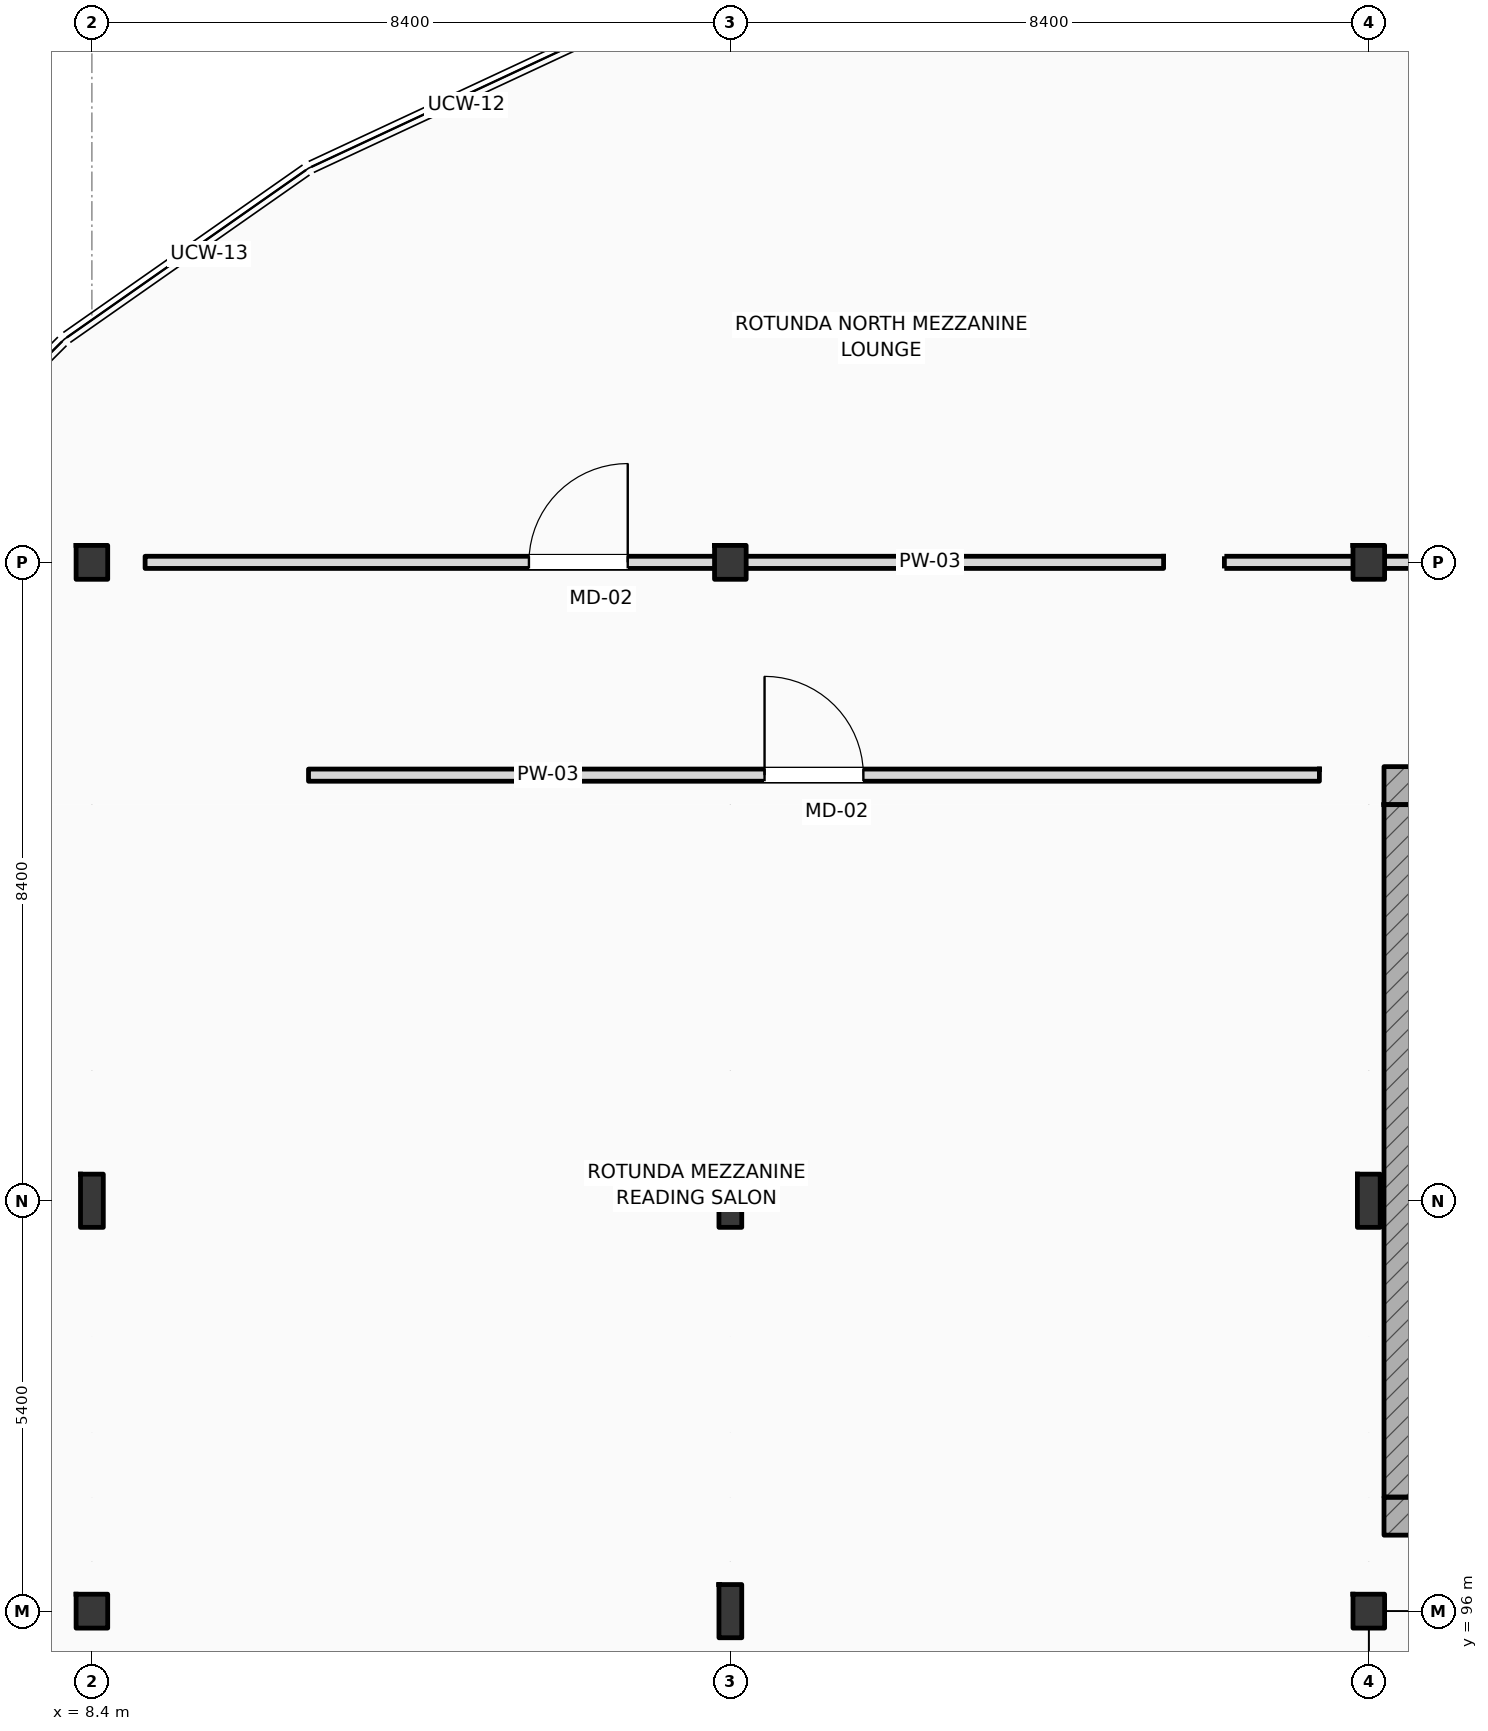
"""IFC4 building model, lengths in metres.
Left out: names, types, materials, properties, quantities, classifications, styles, units other than length and angle.
Written with IfcOpenShell. Run it as: python <this file> out.ifc"""

import sys

from ifc_helpers import new_model, si_unit, direction, frame, frame_2d, origin, origin_2d, place, context, subcontext, project, spatial, rectangle, i_section, extrude, element, fill, save


model = new_model("IFC4")
c1 = context("Model", 3, precision=1e-05, world=origin(), true_north=direction((0.0, 1.0)))
c2 = subcontext(c1, "Body", "Model", "MODEL_VIEW")
j1 = project(units=[si_unit("LENGTHUNIT", "METRE"), si_unit("PLANEANGLEUNIT", "RADIAN")], contexts=[c1])
p1 = place(None, origin())
s1 = spatial("IfcSite", under=j1, at=p1, CompositionType="ELEMENT")
p2 = place(p1, origin())
s2 = spatial("IfcBuilding", under=s1, at=p2, CompositionType="ELEMENT")
p3 = place(p2, frame((0.0, 0.0, 6.0)))
s3 = spatial("IfcBuildingStorey", under=s2, at=p3, CompositionType="ELEMENT", Elevation=6.0)
p4 = place(p3, frame((8.4, 96.0, 0.0), z_axis=(0.0, 0.0, 1.0), x_axis=(1.0, 0.0, 0.0)))
e1 = element("IfcColumn", 1, at=p4, inside=s3, PredefinedType="COLUMN", context=c2, shape_type="SweptSolid", body=[
    extrude(i_section(OverallWidth=0.416, OverallDepth=0.446, WebThickness=0.036, FlangeThickness=0.048, FilletRadius=0.015, at=origin_2d()), origin(), (0.0, 0.0, 1.0), 5.4),
])
p5 = place(p3, frame((16.8, 96.0, 0.0), z_axis=(0.0, 0.0, 1.0), x_axis=(1.0, 0.0, 0.0)))
e2 = element("IfcColumn", 2, at=p5, inside=s3, PredefinedType="COLUMN", context=c2, shape_type="SweptSolid", body=[
    extrude(i_section(OverallWidth=0.3, OverallDepth=0.7, WebThickness=0.017, FlangeThickness=0.032, FilletRadius=0.027, at=origin_2d()), origin(), (0.0, 0.0, 1.0), 5.4),
])
p6 = place(p3, frame((25.2, 96.0, 0.0), z_axis=(0.0, 0.0, 1.0), x_axis=(1.0, 0.0, 0.0)))
e3 = element("IfcColumn", 3, at=p6, inside=s3, PredefinedType="COLUMN", context=c2, shape_type="SweptSolid", body=[
    extrude(i_section(OverallWidth=0.416, OverallDepth=0.446, WebThickness=0.036, FlangeThickness=0.048, FilletRadius=0.015, at=origin_2d()), origin(), (0.0, 0.0, 1.0), 5.4),
])
p7 = place(p3, frame((8.4, 101.4, 0.0), z_axis=(0.0, 0.0, 1.0), x_axis=(1.0, 0.0, 0.0)))
e4 = element("IfcColumn", 4, at=p7, inside=s3, PredefinedType="COLUMN", context=c2, shape_type="SweptSolid", body=[
    extrude(i_section(OverallWidth=0.3, OverallDepth=0.7, WebThickness=0.017, FlangeThickness=0.032, FilletRadius=0.027, at=origin_2d()), origin(), (0.0, 0.0, 1.0), 5.4),
])
p8 = place(p3, frame((8.4, 109.8, 0.0), z_axis=(0.0, 0.0, 1.0), x_axis=(1.0, 0.0, 0.0)))
e5 = element("IfcColumn", 5, at=p8, inside=s3, PredefinedType="COLUMN", context=c2, shape_type="SweptSolid", body=[
    extrude(i_section(OverallWidth=0.416, OverallDepth=0.446, WebThickness=0.036, FlangeThickness=0.048, FilletRadius=0.015, at=origin_2d()), origin(), (0.0, 0.0, 1.0), 5.4),
])
p9 = place(p3, frame((16.8, 101.4, 0.0), z_axis=(0.0, 0.0, 1.0), x_axis=(1.0, 0.0, 0.0)))
e6 = element("IfcColumn", 6, at=p9, inside=s3, PredefinedType="COLUMN", context=c2, shape_type="SweptSolid", body=[
    extrude(i_section(OverallWidth=0.3, OverallDepth=0.7, WebThickness=0.017, FlangeThickness=0.032, FilletRadius=0.027, at=origin_2d()), origin(), (0.0, 0.0, 1.0), 5.4),
])
p10 = place(p3, frame((16.8, 109.8, 0.0), z_axis=(0.0, 0.0, 1.0), x_axis=(1.0, 0.0, 0.0)))
e7 = element("IfcColumn", 7, at=p10, inside=s3, PredefinedType="COLUMN", context=c2, shape_type="SweptSolid", body=[
    extrude(i_section(OverallWidth=0.416, OverallDepth=0.446, WebThickness=0.036, FlangeThickness=0.048, FilletRadius=0.015, at=origin_2d()), origin(), (0.0, 0.0, 1.0), 5.4),
])
p11 = place(p3, frame((25.2, 101.4, 0.0), z_axis=(0.0, 0.0, 1.0), x_axis=(1.0, 0.0, 0.0)))
e8 = element("IfcColumn", 8, at=p11, inside=s3, PredefinedType="COLUMN", context=c2, shape_type="SweptSolid", body=[
    extrude(i_section(OverallWidth=0.3, OverallDepth=0.7, WebThickness=0.017, FlangeThickness=0.032, FilletRadius=0.027, at=origin_2d()), origin(), (0.0, 0.0, 1.0), 5.4),
])
p12 = place(p3, frame((25.2, 109.8, 0.0), z_axis=(0.0, 0.0, 1.0), x_axis=(1.0, 0.0, 0.0)))
e9 = element("IfcColumn", 9, at=p12, inside=s3, PredefinedType="COLUMN", context=c2, shape_type="SweptSolid", body=[
    extrude(i_section(OverallWidth=0.416, OverallDepth=0.446, WebThickness=0.036, FlangeThickness=0.048, FilletRadius=0.015, at=origin_2d()), origin(), (0.0, 0.0, 1.0), 5.4),
])
for number, where, z_axis, x_axis in (
    (10, (25.4, 106.862, 0.0), (0.0, 0.0, 1.0), (1.0, 0.0, 0.0)),
    (11, (25.4, 97.25, 0.0), (0.0, 0.0, 1.0), (1.0, 0.0, 0.0)),
):
    element("IfcWall", number, at=place(p3, frame(where, z_axis=z_axis, x_axis=x_axis)), inside=s3, PredefinedType="SHEAR", context=c2, shape_type="SweptSolid", body=[
        extrude(rectangle(XDim=5.16, YDim=0.5, at=frame_2d((2.58, 0.0))), origin(), (0.0, 0.0, 1.0), 5.4),
    ])
p13 = place(p3, frame((25.65, 97.5, 0.0), z_axis=(0.0, 0.0, 1.0), x_axis=(0.0, 1.0, 0.0)))
e12 = element("IfcWall", 12, at=p13, inside=s3, PredefinedType="SHEAR", context=c2, shape_type="SweptSolid", body=[
    extrude(rectangle(XDim=9.112, YDim=0.5, at=frame_2d((4.556, 0.0))), origin(), (0.0, 0.0, 1.0), 5.4),
])
p14 = place(p3, frame((23.3, 109.8, 0.0), z_axis=(0.0, 0.0, 1.0), x_axis=(1.0, 0.0, 0.0)))
e13 = element("IfcWall", 13, at=p14, inside=s3, PredefinedType="PARTITIONING", context=c2, shape_type="SweptSolid", body=[
    extrude(rectangle(XDim=40.8, YDim=0.16, at=frame_2d((20.4, 0.0))), origin(), (0.0, 0.0, 1.0), 2.84),
])
p15 = place(p14, frame((19.75, 0.0, 0.0)))
e14 = element("IfcOpeningElement", 14, at=p15, cuts=e13, PredefinedType="OPENING", context=c2, shape_type="SweptSolid", body=[
    extrude(rectangle(XDim=1.3, YDim=2.2, at=frame_2d((0.65, 1.1))), frame((0.0, 0.09, 0.0), z_axis=(0.0, -1.0, 0.0), x_axis=(1.0, 0.0, 0.0)), (0.0, 0.0, 1.0), 0.18),
])
p16 = place(p3, frame((11.25, 107.0, 0.0), z_axis=(0.0, 0.0, 1.0), x_axis=(1.0, 0.0, 0.0)))
e15 = element("IfcWall", 15, at=p16, inside=s3, PredefinedType="PARTITIONING", context=c2, shape_type="SweptSolid", body=[
    extrude(rectangle(XDim=13.3, YDim=0.16, at=frame_2d((6.65, 0.0))), origin(), (0.0, 0.0, 1.0), 5.05),
])
p17 = place(p16, frame((6.0, 0.0, 0.0)))
e16 = element("IfcOpeningElement", 16, at=p17, cuts=e15, PredefinedType="OPENING", context=c2, shape_type="SweptSolid", body=[
    extrude(rectangle(XDim=1.3, YDim=2.2, at=frame_2d((0.65, 1.1))), frame((0.0, 0.09, 0.0), z_axis=(0.0, -1.0, 0.0), x_axis=(1.0, 0.0, 0.0)), (0.0, 0.0, 1.0), 0.18),
])
p18 = place(p3, frame((9.1, 109.8, 0.0), z_axis=(0.0, 0.0, 1.0), x_axis=(1.0, 0.0, 0.0)))
e17 = element("IfcWall", 17, at=p18, inside=s3, PredefinedType="PARTITIONING", context=c2, shape_type="SweptSolid", body=[
    extrude(rectangle(XDim=13.4, YDim=0.16, at=frame_2d((6.7, 0.0))), origin(), (0.0, 0.0, 1.0), 2.84),
])
p19 = place(p18, frame((5.05, 0.0, 0.0)))
e18 = element("IfcOpeningElement", 18, at=p19, cuts=e17, PredefinedType="OPENING", context=c2, shape_type="SweptSolid", body=[
    extrude(rectangle(XDim=1.3, YDim=2.2, at=frame_2d((0.65, 1.1))), frame((0.0, 0.09, 0.0), z_axis=(0.0, -1.0, 0.0), x_axis=(1.0, 0.0, 0.0)), (0.0, 0.0, 1.0), 0.18),
])
p20 = place(p17, origin())
e19 = element("IfcDoor", 19, at=p20, inside=s3, OperationType="SINGLE_SWING_LEFT", PredefinedType="DOOR", context=c2, shape_type="SweptSolid", body=[
    extrude(rectangle(XDim=1.3, YDim=2.2, at=frame_2d((0.65, 1.1))), frame((0.0, 0.025, 0.0), z_axis=(0.0, -1.0, 0.0), x_axis=(1.0, 0.0, 0.0)), (0.0, 0.0, 1.0), 0.05),
])
fill(e16, e19)
p21 = place(p19, origin())
e20 = element("IfcDoor", 20, at=p21, inside=s3, OperationType="SINGLE_SWING_RIGHT", PredefinedType="DOOR", context=c2, shape_type="SweptSolid", body=[
    extrude(rectangle(XDim=1.3, YDim=2.2, at=frame_2d((0.65, 1.1))), frame((0.0, 0.025, 0.0), z_axis=(0.0, -1.0, 0.0), x_axis=(1.0, 0.0, 0.0)), (0.0, 0.0, 1.0), 0.05),
])
fill(e18, e20)
save(model, sys.argv[1])
